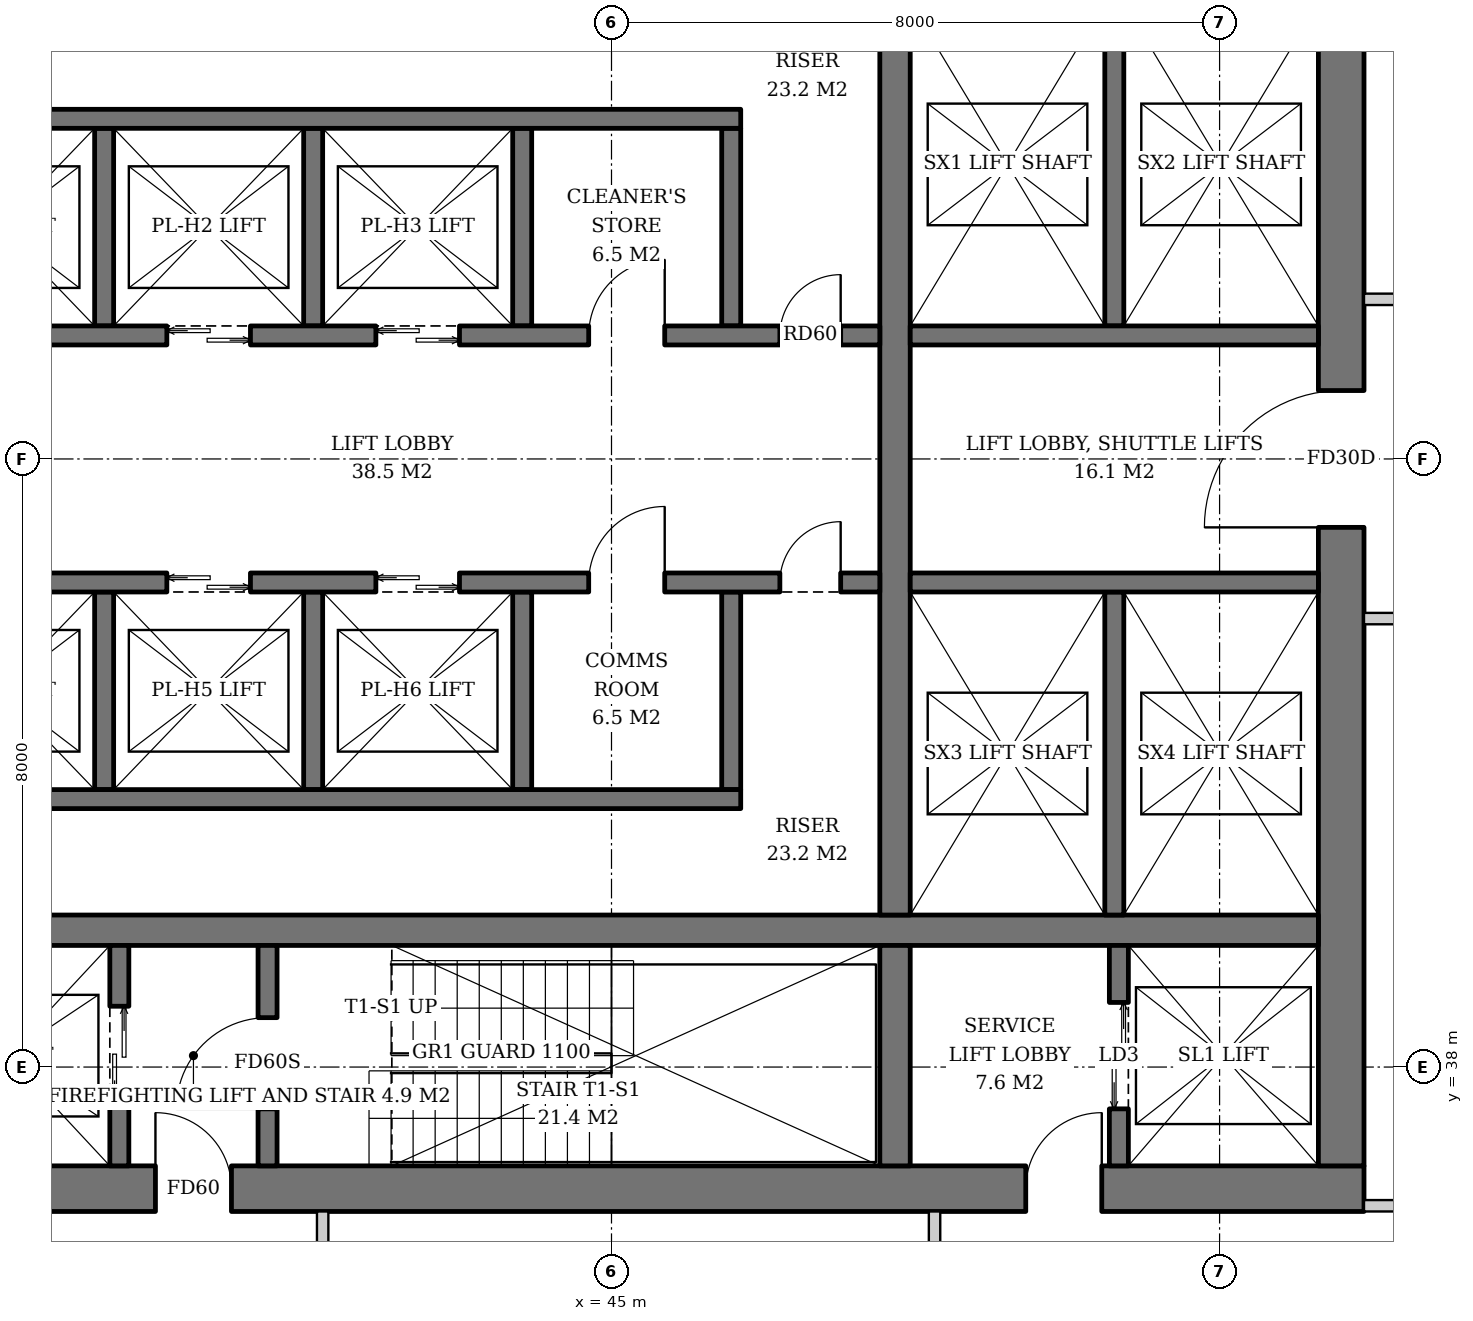
"""IFC4 building model, lengths in metres.
Left out: names, types, materials, properties, quantities, classifications, styles, units other than length and angle.
Written with IfcOpenShell. Run it as: python <this file> out.ifc"""

import sys

from ifc_helpers import new_model, si_unit, direction, frame, frame_2d, origin, place, context, subcontext, project, spatial, rectangle, extrude, element, fill, save


model = new_model("IFC4")
c1 = context("Model", 3, precision=1e-05, world=origin(), true_north=direction((0.0, 1.0)))
c2 = subcontext(c1, "Body", "Model", "MODEL_VIEW")
j1 = project(units=[si_unit("LENGTHUNIT", "METRE"), si_unit("PLANEANGLEUNIT", "RADIAN")], contexts=[c1])
p1 = place(None, origin())
s1 = spatial("IfcSite", under=j1, at=p1, CompositionType="ELEMENT")
p2 = place(p1, origin())
s2 = spatial("IfcBuilding", under=s1, at=p2, CompositionType="ELEMENT")
p3 = place(p2, frame((0.0, 0.0, 180.6)))
s3 = spatial("IfcBuildingStorey", under=s2, at=p3, CompositionType="ELEMENT", Elevation=180.6)
p4 = place(p3, frame((35.1, 36.4, 0.0), z_axis=(0.0, 0.0, 1.0), x_axis=(1.0, 0.0, 0.0)))
e1 = element("IfcWall", 1, at=p4, inside=s3, PredefinedType="SHEAR", context=c2, shape_type="SweptSolid", body=[
    extrude(rectangle(XDim=19.8, YDim=0.6, at=frame_2d((9.9, 0.0))), origin(), (0.0, 0.0, 1.0), 3.8),
])
p5 = place(p4, frame((3.9, 0.0, 0.0)))
e2 = element("IfcOpeningElement", 2, at=p5, cuts=e1, PredefinedType="OPENING", context=c2, shape_type="SweptSolid", body=[
    extrude(rectangle(XDim=1.0, YDim=2.1, at=frame_2d((0.5, 1.05))), frame((0.0, 0.31, 0.0), z_axis=(0.0, -1.0, 0.0), x_axis=(1.0, 0.0, 0.0)), (0.0, 0.0, 1.0), 0.62),
])
p6 = place(p4, frame((15.35, 0.0, 0.0)))
e3 = element("IfcOpeningElement", 3, at=p6, cuts=e1, PredefinedType="OPENING", context=c2, shape_type="SweptSolid", body=[
    extrude(rectangle(XDim=1.0, YDim=2.1, at=frame_2d((0.5, 1.05))), frame((0.0, 0.31, 0.0), z_axis=(0.0, -1.0, 0.0), x_axis=(1.0, 0.0, 0.0)), (0.0, 0.0, 1.0), 0.62),
])
p7 = place(p3, frame((54.6, 36.7, 0.0), z_axis=(0.0, 0.0, 1.0), x_axis=(0.0, 1.0, 0.0)))
e4 = element("IfcWall", 4, at=p7, inside=s3, PredefinedType="SHEAR", context=c2, shape_type="SweptSolid", body=[
    extrude(rectangle(XDim=18.6, YDim=0.6, at=frame_2d((9.3, 0.0))), origin(), (0.0, 0.0, 1.0), 3.8),
])
p8 = place(p7, frame((8.4, 0.0, 0.0)))
e5 = element("IfcOpeningElement", 5, at=p8, cuts=e4, PredefinedType="OPENING", context=c2, shape_type="SweptSolid", body=[
    extrude(rectangle(XDim=1.8, YDim=2.4, at=frame_2d((0.9, 1.2))), frame((0.0, 0.31, 0.0), z_axis=(0.0, -1.0, 0.0), x_axis=(1.0, 0.0, 0.0)), (0.0, 0.0, 1.0), 0.62),
])
p9 = place(p3, frame((35.7, 39.8, 0.0), z_axis=(0.0, 0.0, 1.0), x_axis=(1.0, 0.0, 0.0)))
e6 = element("IfcWall", 6, at=p9, inside=s3, PredefinedType="SHEAR", context=c2, shape_type="SweptSolid", body=[
    extrude(rectangle(XDim=18.6, YDim=0.4, at=frame_2d((9.3, 0.0))), origin(), (0.0, 0.0, 1.0), 3.8),
])
p10 = place(p3, frame((48.73, 36.7, 0.0), z_axis=(0.0, 0.0, 1.0), x_axis=(0.0, 1.0, 0.0)))
e7 = element("IfcWall", 7, at=p10, inside=s3, PredefinedType="SHEAR", context=c2, shape_type="SweptSolid", body=[
    extrude(rectangle(XDim=2.9, YDim=0.4, at=frame_2d((1.45, 0.0))), origin(), (0.0, 0.0, 1.0), 3.8),
])
p11 = place(p3, frame((48.73, 40.0, 0.0), z_axis=(0.0, 0.0, 1.0), x_axis=(0.0, 1.0, 0.0)))
e8 = element("IfcWall", 8, at=p11, inside=s3, PredefinedType="SHEAR", context=c2, shape_type="SweptSolid", body=[
    extrude(rectangle(XDim=12.0, YDim=0.4, at=frame_2d((6.0, 0.0))), origin(), (0.0, 0.0, 1.0), 3.8),
])
p12 = place(p3, frame((38.525, 36.7, 0.0), z_axis=(0.0, 0.0, 1.0), x_axis=(0.0, 1.0, 0.0)))
e9 = element("IfcWall", 9, at=p12, inside=s3, PredefinedType="SHEAR", context=c2, shape_type="SweptSolid", body=[
    extrude(rectangle(XDim=2.9, YDim=0.25, at=frame_2d((1.45, 0.0))), origin(), (0.0, 0.0, 1.0), 3.8),
])
p13 = place(p12, frame((0.8, 0.0, 0.0)))
e10 = element("IfcOpeningElement", 10, at=p13, cuts=e9, PredefinedType="OPENING", context=c2, shape_type="SweptSolid", body=[
    extrude(rectangle(XDim=1.3, YDim=2.2, at=frame_2d((0.65, 1.1))), frame((0.0, 0.135, 0.0), z_axis=(0.0, -1.0, 0.0), x_axis=(1.0, 0.0, 0.0)), (0.0, 0.0, 1.0), 0.27),
])
p14 = place(p3, frame((40.475, 36.7, 0.0), z_axis=(0.0, 0.0, 1.0), x_axis=(0.0, 1.0, 0.0)))
e11 = element("IfcWall", 11, at=p14, inside=s3, PredefinedType="SHEAR", context=c2, shape_type="SweptSolid", body=[
    extrude(rectangle(XDim=2.9, YDim=0.25, at=frame_2d((1.45, 0.0))), origin(), (0.0, 0.0, 1.0), 3.8),
])
p15 = place(p14, frame((0.75, 0.0, 0.0)))
e12 = element("IfcOpeningElement", 12, at=p15, cuts=e11, PredefinedType="OPENING", context=c2, shape_type="SweptSolid", body=[
    extrude(rectangle(XDim=1.2, YDim=2.1, at=frame_2d((0.6, 1.05))), frame((0.0, 0.135, 0.0), z_axis=(0.0, -1.0, 0.0), x_axis=(1.0, 0.0, 0.0)), (0.0, 0.0, 1.0), 0.27),
])
p16 = place(p3, frame((51.675, 36.7, 0.0), z_axis=(0.0, 0.0, 1.0), x_axis=(0.0, 1.0, 0.0)))
e13 = element("IfcWall", 13, at=p16, inside=s3, PredefinedType="SHEAR", context=c2, shape_type="SweptSolid", body=[
    extrude(rectangle(XDim=2.9, YDim=0.25, at=frame_2d((1.45, 0.0))), origin(), (0.0, 0.0, 1.0), 3.8),
])
p17 = place(p16, frame((0.75, 0.0, 0.0)))
e14 = element("IfcOpeningElement", 14, at=p17, cuts=e13, PredefinedType="OPENING", context=c2, shape_type="SweptSolid", body=[
    extrude(rectangle(XDim=1.4, YDim=2.4, at=frame_2d((0.7, 1.2))), frame((0.0, 0.135, 0.0), z_axis=(0.0, -1.0, 0.0), x_axis=(1.0, 0.0, 0.0)), (0.0, 0.0, 1.0), 0.27),
])
for number, where, z_axis, x_axis in (
    (15, (38.325, 47.75, 0.0), (0.0, 0.0, 1.0), (0.0, 1.0, 0.0)),
    (16, (41.075, 47.75, 0.0), (0.0, 0.0, 1.0), (0.0, 1.0, 0.0)),
    (17, (43.825, 47.75, 0.0), (0.0, 0.0, 1.0), (0.0, 1.0, 0.0)),
    (18, (46.575, 47.75, 0.0), (0.0, 0.0, 1.0), (0.0, 1.0, 0.0)),
):
    element("IfcWall", number, at=place(p3, frame(where, z_axis=z_axis, x_axis=x_axis)), inside=s3, PredefinedType="SHEAR", context=c2, shape_type="SweptSolid", body=[
        extrude(rectangle(XDim=2.6, YDim=0.25, at=frame_2d((1.3, 0.0))), origin(), (0.0, 0.0, 1.0), 3.8),
    ])
p18 = place(p3, frame((35.7, 50.475, 0.0), z_axis=(0.0, 0.0, 1.0), x_axis=(1.0, 0.0, 0.0)))
e19 = element("IfcWall", 19, at=p18, inside=s3, PredefinedType="SHEAR", context=c2, shape_type="SweptSolid", body=[
    extrude(rectangle(XDim=11.0, YDim=0.25, at=frame_2d((5.5, 0.0))), origin(), (0.0, 0.0, 1.0), 3.8),
])
p19 = place(p3, frame((35.7, 47.625, 0.0), z_axis=(0.0, 0.0, 1.0), x_axis=(1.0, 0.0, 0.0)))
e20 = element("IfcWall", 20, at=p19, inside=s3, PredefinedType="SHEAR", context=c2, shape_type="SweptSolid", body=[
    extrude(rectangle(XDim=12.83, YDim=0.25, at=frame_2d((6.415, 0.0))), origin(), (0.0, 0.0, 1.0), 3.8),
])
p20 = place(p19, frame((0.7, 0.0, 0.0)))
e21 = element("IfcOpeningElement", 21, at=p20, cuts=e20, PredefinedType="OPENING", context=c2, shape_type="SweptSolid", body=[
    extrude(rectangle(XDim=1.1, YDim=2.2, at=frame_2d((0.55, 1.1))), frame((0.0, 0.135, 0.0), z_axis=(0.0, -1.0, 0.0), x_axis=(1.0, 0.0, 0.0)), (0.0, 0.0, 1.0), 0.27),
])
p21 = place(p19, frame((3.45, 0.0, 0.0)))
e22 = element("IfcOpeningElement", 22, at=p21, cuts=e20, PredefinedType="OPENING", context=c2, shape_type="SweptSolid", body=[
    extrude(rectangle(XDim=1.1, YDim=2.2, at=frame_2d((0.55, 1.1))), frame((0.0, 0.135, 0.0), z_axis=(0.0, -1.0, 0.0), x_axis=(1.0, 0.0, 0.0)), (0.0, 0.0, 1.0), 0.27),
])
p22 = place(p19, frame((6.2, 0.0, 0.0)))
e23 = element("IfcOpeningElement", 23, at=p22, cuts=e20, PredefinedType="OPENING", context=c2, shape_type="SweptSolid", body=[
    extrude(rectangle(XDim=1.1, YDim=2.2, at=frame_2d((0.55, 1.1))), frame((0.0, 0.135, 0.0), z_axis=(0.0, -1.0, 0.0), x_axis=(1.0, 0.0, 0.0)), (0.0, 0.0, 1.0), 0.27),
])
p23 = place(p19, frame((9.0, 0.0, 0.0)))
e24 = element("IfcOpeningElement", 24, at=p23, cuts=e20, PredefinedType="OPENING", context=c2, shape_type="SweptSolid", body=[
    extrude(rectangle(XDim=1.0, YDim=2.1, at=frame_2d((0.5, 1.05))), frame((0.0, 0.135, 0.0), z_axis=(0.0, -1.0, 0.0), x_axis=(1.0, 0.0, 0.0)), (0.0, 0.0, 1.0), 0.27),
])
p24 = place(p19, frame((11.515, 0.0, 0.0)))
e25 = element("IfcOpeningElement", 25, at=p24, cuts=e20, PredefinedType="OPENING", context=c2, shape_type="SweptSolid", body=[
    extrude(rectangle(XDim=0.8, YDim=2.0, at=frame_2d((0.4, 1.0))), frame((0.0, 0.135, 0.0), z_axis=(0.0, -1.0, 0.0), x_axis=(1.0, 0.0, 0.0)), (0.0, 0.0, 1.0), 0.27),
])
for number, where, z_axis, x_axis in (
    (26, (38.325, 44.25, 0.0), (0.0, 0.0, 1.0), (0.0, -1.0, 0.0)),
    (27, (41.075, 44.25, 0.0), (0.0, 0.0, 1.0), (0.0, -1.0, 0.0)),
    (28, (43.825, 44.25, 0.0), (0.0, 0.0, 1.0), (0.0, -1.0, 0.0)),
    (29, (46.575, 44.25, 0.0), (0.0, 0.0, 1.0), (0.0, -1.0, 0.0)),
):
    element("IfcWall", number, at=place(p3, frame(where, z_axis=z_axis, x_axis=x_axis)), inside=s3, PredefinedType="SHEAR", context=c2, shape_type="SweptSolid", body=[
        extrude(rectangle(XDim=2.6, YDim=0.25, at=frame_2d((1.3, 0.0))), origin(), (0.0, 0.0, 1.0), 3.8),
    ])
p25 = place(p3, frame((35.7, 41.525, 0.0), z_axis=(0.0, 0.0, 1.0), x_axis=(1.0, 0.0, 0.0)))
e30 = element("IfcWall", 30, at=p25, inside=s3, PredefinedType="SHEAR", context=c2, shape_type="SweptSolid", body=[
    extrude(rectangle(XDim=11.0, YDim=0.25, at=frame_2d((5.5, 0.0))), origin(), (0.0, 0.0, 1.0), 3.8),
])
p26 = place(p3, frame((35.7, 44.375, 0.0), z_axis=(0.0, 0.0, 1.0), x_axis=(1.0, 0.0, 0.0)))
e31 = element("IfcWall", 31, at=p26, inside=s3, PredefinedType="SHEAR", context=c2, shape_type="SweptSolid", body=[
    extrude(rectangle(XDim=12.83, YDim=0.25, at=frame_2d((6.415, 0.0))), origin(), (0.0, 0.0, 1.0), 3.8),
])
p27 = place(p26, frame((0.7, 0.0, 0.0)))
e32 = element("IfcOpeningElement", 32, at=p27, cuts=e31, PredefinedType="OPENING", context=c2, shape_type="SweptSolid", body=[
    extrude(rectangle(XDim=1.1, YDim=2.2, at=frame_2d((0.55, 1.1))), frame((0.0, 0.135, 0.0), z_axis=(0.0, -1.0, 0.0), x_axis=(1.0, 0.0, 0.0)), (0.0, 0.0, 1.0), 0.27),
])
p28 = place(p26, frame((3.45, 0.0, 0.0)))
e33 = element("IfcOpeningElement", 33, at=p28, cuts=e31, PredefinedType="OPENING", context=c2, shape_type="SweptSolid", body=[
    extrude(rectangle(XDim=1.1, YDim=2.2, at=frame_2d((0.55, 1.1))), frame((0.0, 0.135, 0.0), z_axis=(0.0, -1.0, 0.0), x_axis=(1.0, 0.0, 0.0)), (0.0, 0.0, 1.0), 0.27),
])
p29 = place(p26, frame((6.2, 0.0, 0.0)))
e34 = element("IfcOpeningElement", 34, at=p29, cuts=e31, PredefinedType="OPENING", context=c2, shape_type="SweptSolid", body=[
    extrude(rectangle(XDim=1.1, YDim=2.2, at=frame_2d((0.55, 1.1))), frame((0.0, 0.135, 0.0), z_axis=(0.0, -1.0, 0.0), x_axis=(1.0, 0.0, 0.0)), (0.0, 0.0, 1.0), 0.27),
])
p30 = place(p26, frame((9.0, 0.0, 0.0)))
e35 = element("IfcOpeningElement", 35, at=p30, cuts=e31, PredefinedType="OPENING", context=c2, shape_type="SweptSolid", body=[
    extrude(rectangle(XDim=1.0, YDim=2.1, at=frame_2d((0.5, 1.05))), frame((0.0, 0.135, 0.0), z_axis=(0.0, -1.0, 0.0), x_axis=(1.0, 0.0, 0.0)), (0.0, 0.0, 1.0), 0.27),
])
p31 = place(p26, frame((11.515, 0.0, 0.0)))
e36 = element("IfcOpeningElement", 36, at=p31, cuts=e31, PredefinedType="OPENING", context=c2, shape_type="SweptSolid", body=[
    extrude(rectangle(XDim=0.8, YDim=2.0, at=frame_2d((0.4, 1.0))), frame((0.0, 0.135, 0.0), z_axis=(0.0, -1.0, 0.0), x_axis=(1.0, 0.0, 0.0)), (0.0, 0.0, 1.0), 0.27),
])
p32 = place(p3, frame((51.615, 47.75, 0.0), z_axis=(0.0, 0.0, 1.0), x_axis=(0.0, 1.0, 0.0)))
e37 = element("IfcWall", 37, at=p32, inside=s3, PredefinedType="SHEAR", context=c2, shape_type="SweptSolid", body=[
    extrude(rectangle(XDim=4.25, YDim=0.25, at=frame_2d((2.125, 0.0))), origin(), (0.0, 0.0, 1.0), 3.8),
])
p33 = place(p3, frame((48.93, 47.625, 0.0), z_axis=(0.0, 0.0, 1.0), x_axis=(1.0, 0.0, 0.0)))
e38 = element("IfcWall", 38, at=p33, inside=s3, PredefinedType="SHEAR", context=c2, shape_type="SweptSolid", body=[
    extrude(rectangle(XDim=5.37, YDim=0.25, at=frame_2d((2.685, 0.0))), origin(), (0.0, 0.0, 1.0), 3.8),
])
p34 = place(p3, frame((51.615, 44.25, 0.0), z_axis=(0.0, 0.0, 1.0), x_axis=(0.0, -1.0, 0.0)))
e39 = element("IfcWall", 39, at=p34, inside=s3, PredefinedType="SHEAR", context=c2, shape_type="SweptSolid", body=[
    extrude(rectangle(XDim=4.25, YDim=0.25, at=frame_2d((2.125, 0.0))), origin(), (0.0, 0.0, 1.0), 3.8),
])
p35 = place(p3, frame((48.93, 44.375, 0.0), z_axis=(0.0, 0.0, 1.0), x_axis=(1.0, 0.0, 0.0)))
e40 = element("IfcWall", 40, at=p35, inside=s3, PredefinedType="SHEAR", context=c2, shape_type="SweptSolid", body=[
    extrude(rectangle(XDim=5.37, YDim=0.25, at=frame_2d((2.685, 0.0))), origin(), (0.0, 0.0, 1.0), 3.8),
])
p36 = place(p3, frame((54.9, 36.175, 0.0), z_axis=(0.0, 0.0, 1.0), x_axis=(1.0, 0.0, 0.0)))
e41 = element("IfcWall", 41, at=p36, inside=s3, PredefinedType="PARTITIONING", context=c2, shape_type="SweptSolid", body=[
    extrude(rectangle(XDim=2.325, YDim=0.15, at=frame_2d((1.163, 0.0))), origin(), (0.0, 0.0, 1.0), 2.867),
])
for number, where, z_axis, x_axis in (
    (42, (54.9, 43.9, 0.0), (0.0, 0.0, 1.0), (1.0, 0.0, 0.0)),
    (43, (54.9, 48.1, 0.0), (0.0, 0.0, 1.0), (1.0, 0.0, 0.0)),
    (44, (41.2, 36.1, 0.0), (0.0, 0.0, 1.0), (0.0, -1.0, 0.0)),
    (45, (49.25, 36.1, 0.0), (0.0, 0.0, 1.0), (0.0, -1.0, 0.0)),
):
    element("IfcWall", number, at=place(p3, frame(where, z_axis=z_axis, x_axis=x_axis)), inside=s3, PredefinedType="PARTITIONING", context=c2, shape_type="SweptSolid", body=[
        extrude(rectangle(XDim=2.325, YDim=0.15, at=frame_2d((1.163, 0.0))), origin(), (0.0, 0.0, 1.0), 3.62),
    ])
p37 = place(p13, origin())
e46 = element("IfcDoor", 46, at=p37, inside=s3, OperationType="DOUBLE_DOOR_SLIDING", PredefinedType="DOOR", context=c2, shape_type="SweptSolid", body=[
    extrude(rectangle(XDim=1.3, YDim=2.2, at=frame_2d((0.65, 1.1))), frame((0.0, 0.025, 0.0), z_axis=(0.0, -1.0, 0.0), x_axis=(1.0, 0.0, 0.0)), (0.0, 0.0, 1.0), 0.05),
])
fill(e10, e46)
p38 = place(p15, origin())
e47 = element("IfcDoor", 47, at=p38, inside=s3, OperationType="SINGLE_SWING_LEFT", PredefinedType="DOOR", context=c2, shape_type="SweptSolid", body=[
    extrude(rectangle(XDim=1.2, YDim=2.1, at=frame_2d((0.6, 1.05))), frame((0.0, 0.025, 0.0), z_axis=(0.0, -1.0, 0.0), x_axis=(1.0, 0.0, 0.0)), (0.0, 0.0, 1.0), 0.05),
])
fill(e12, e47)
p39 = place(p17, origin())
e48 = element("IfcDoor", 48, at=p39, inside=s3, OperationType="DOUBLE_DOOR_SLIDING", PredefinedType="DOOR", context=c2, shape_type="SweptSolid", body=[
    extrude(rectangle(XDim=1.4, YDim=2.4, at=frame_2d((0.7, 1.2))), frame((0.0, 0.025, 0.0), z_axis=(0.0, -1.0, 0.0), x_axis=(1.0, 0.0, 0.0)), (0.0, 0.0, 1.0), 0.05),
])
fill(e14, e48)
p40 = place(p21, origin())
e49 = element("IfcDoor", 49, at=p40, inside=s3, OperationType="DOUBLE_DOOR_SLIDING", PredefinedType="DOOR", context=c2, shape_type="SweptSolid", body=[
    extrude(rectangle(XDim=1.1, YDim=2.2, at=frame_2d((0.55, 1.1))), frame((0.0, 0.025, 0.0), z_axis=(0.0, -1.0, 0.0), x_axis=(1.0, 0.0, 0.0)), (0.0, 0.0, 1.0), 0.05),
])
fill(e22, e49)
p41 = place(p22, origin())
e50 = element("IfcDoor", 50, at=p41, inside=s3, OperationType="DOUBLE_DOOR_SLIDING", PredefinedType="DOOR", context=c2, shape_type="SweptSolid", body=[
    extrude(rectangle(XDim=1.1, YDim=2.2, at=frame_2d((0.55, 1.1))), frame((0.0, 0.025, 0.0), z_axis=(0.0, -1.0, 0.0), x_axis=(1.0, 0.0, 0.0)), (0.0, 0.0, 1.0), 0.05),
])
fill(e23, e50)
p42 = place(p23, origin())
e51 = element("IfcDoor", 51, at=p42, inside=s3, OperationType="SINGLE_SWING_RIGHT", PredefinedType="DOOR", context=c2, shape_type="SweptSolid", body=[
    extrude(rectangle(XDim=1.0, YDim=2.1, at=frame_2d((0.5, 1.05))), frame((0.0, 0.025, 0.0), z_axis=(0.0, -1.0, 0.0), x_axis=(1.0, 0.0, 0.0)), (0.0, 0.0, 1.0), 0.05),
])
fill(e24, e51)
p43 = place(p24, origin())
e52 = element("IfcDoor", 52, at=p43, inside=s3, OperationType="SINGLE_SWING_RIGHT", PredefinedType="DOOR", context=c2, shape_type="SweptSolid", body=[
    extrude(rectangle(XDim=0.8, YDim=2.0, at=frame_2d((0.4, 1.0))), frame((0.0, 0.025, 0.0), z_axis=(0.0, -1.0, 0.0), x_axis=(1.0, 0.0, 0.0)), (0.0, 0.0, 1.0), 0.05),
])
fill(e25, e52)
p44 = place(p28, origin())
e53 = element("IfcDoor", 53, at=p44, inside=s3, OperationType="DOUBLE_DOOR_SLIDING", PredefinedType="DOOR", context=c2, shape_type="SweptSolid", body=[
    extrude(rectangle(XDim=1.1, YDim=2.2, at=frame_2d((0.55, 1.1))), frame((0.0, 0.025, 0.0), z_axis=(0.0, -1.0, 0.0), x_axis=(1.0, 0.0, 0.0)), (0.0, 0.0, 1.0), 0.05),
])
fill(e33, e53)
p45 = place(p29, origin())
e54 = element("IfcDoor", 54, at=p45, inside=s3, OperationType="DOUBLE_DOOR_SLIDING", PredefinedType="DOOR", context=c2, shape_type="SweptSolid", body=[
    extrude(rectangle(XDim=1.1, YDim=2.2, at=frame_2d((0.55, 1.1))), frame((0.0, 0.025, 0.0), z_axis=(0.0, -1.0, 0.0), x_axis=(1.0, 0.0, 0.0)), (0.0, 0.0, 1.0), 0.05),
])
fill(e34, e54)
p46 = place(p30, origin())
e55 = element("IfcDoor", 55, at=p46, inside=s3, OperationType="SINGLE_SWING_RIGHT", PredefinedType="DOOR", context=c2, shape_type="SweptSolid", body=[
    extrude(rectangle(XDim=1.0, YDim=2.1, at=frame_2d((0.5, 1.05))), frame((0.0, 0.025, 0.0), z_axis=(0.0, -1.0, 0.0), x_axis=(1.0, 0.0, 0.0)), (0.0, 0.0, 1.0), 0.05),
])
fill(e35, e55)
p47 = place(p31, origin())
e56 = element("IfcDoor", 56, at=p47, inside=s3, OperationType="SINGLE_SWING_RIGHT", PredefinedType="DOOR", context=c2, shape_type="SweptSolid", body=[
    extrude(rectangle(XDim=0.8, YDim=2.0, at=frame_2d((0.4, 1.0))), frame((0.0, 0.025, 0.0), z_axis=(0.0, -1.0, 0.0), x_axis=(1.0, 0.0, 0.0)), (0.0, 0.0, 1.0), 0.05),
])
fill(e36, e56)
p48 = place(p5, origin())
e57 = element("IfcDoor", 57, at=p48, inside=s3, OperationType="SINGLE_SWING_LEFT", PredefinedType="DOOR", context=c2, shape_type="SweptSolid", body=[
    extrude(rectangle(XDim=1.0, YDim=2.1, at=frame_2d((0.5, 1.05))), frame((0.0, 0.025, 0.0), z_axis=(0.0, -1.0, 0.0), x_axis=(1.0, 0.0, 0.0)), (0.0, 0.0, 1.0), 0.05),
])
fill(e2, e57)
p49 = place(p8, origin())
e58 = element("IfcDoor", 58, at=p49, inside=s3, OperationType="DOUBLE_DOOR_SINGLE_SWING", PredefinedType="DOOR", context=c2, shape_type="SweptSolid", body=[
    extrude(rectangle(XDim=1.8, YDim=2.4, at=frame_2d((0.9, 1.2))), frame((0.0, 0.025, 0.0), z_axis=(0.0, -1.0, 0.0), x_axis=(1.0, 0.0, 0.0)), (0.0, 0.0, 1.0), 0.05),
])
fill(e5, e58)
p50 = place(p6, origin())
e59 = element("IfcDoor", 59, at=p50, inside=s3, OperationType="SINGLE_SWING_RIGHT", PredefinedType="DOOR", context=c2, shape_type="SweptSolid", body=[
    extrude(rectangle(XDim=1.0, YDim=2.1, at=frame_2d((0.5, 1.05))), frame((0.0, 0.025, 0.0), z_axis=(0.0, -1.0, 0.0), x_axis=(1.0, 0.0, 0.0)), (0.0, 0.0, 1.0), 0.05),
])
fill(e3, e59)
save(model, sys.argv[1])
